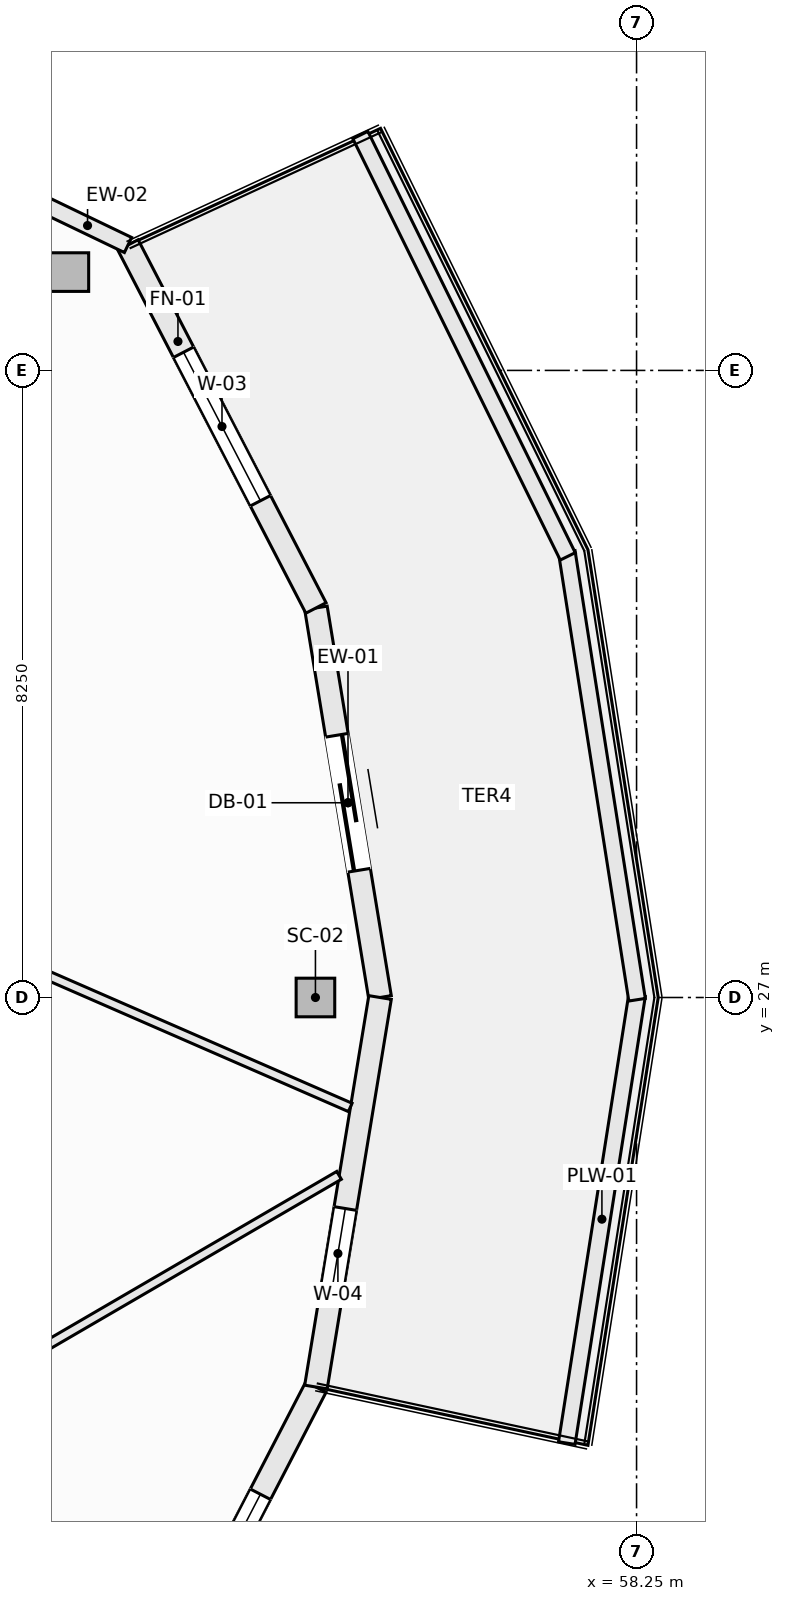
"""IFC4 building model, lengths in metres.
Left out: names, types, materials, properties, quantities, classifications, styles, units other than length and angle.
Written with IfcOpenShell. Run it as: python <this file> out.ifc"""

import sys

from ifc_helpers import new_model, si_unit, direction, frame, frame_2d, origin, origin_2d, place, context, subcontext, project, spatial, rectangle, hollow_rectangle, extrude, element, fill, save


model = new_model("IFC4")
c1 = context("Model", 3, precision=1e-05, world=origin(), true_north=direction((0.0, 1.0)))
c2 = subcontext(c1, "Body", "Model", "MODEL_VIEW")
j1 = project(units=[si_unit("LENGTHUNIT", "METRE"), si_unit("PLANEANGLEUNIT", "RADIAN")], contexts=[c1])
p1 = place(None, origin())
s1 = spatial("IfcSite", under=j1, at=p1, CompositionType="ELEMENT")
p2 = place(p1, origin())
s2 = spatial("IfcBuilding", under=s1, at=p2, CompositionType="ELEMENT")
p3 = place(p2, frame((0.0, 0.0, 232.7)))
s3 = spatial("IfcBuildingStorey", under=s2, at=p3, CompositionType="ELEMENT", Elevation=232.7)
for number, where, z_axis, x_axis in (
    (1, (54.025, 27.0, -0.27), (0.0, 0.0, 1.0), (1.0, 0.0, 0.0)),
    (2, (50.787, 36.544, -0.27), (0.0, 0.0, 1.0), (1.0, 0.0, 0.0)),
):
    element("IfcColumn", number, at=place(p3, frame(where, z_axis=z_axis, x_axis=x_axis)), inside=s3, PredefinedType="COLUMN", context=c2, shape_type="SweptSolid", body=[
        extrude(hollow_rectangle(XDim=0.508, YDim=0.508, WallThickness=0.019, at=origin_2d()), origin(), (0.0, 0.0, 1.0), 3.3),
    ])
p4 = place(p3, frame((54.032, 32.125, 0.0), z_axis=(0.0, 0.0, 1.0), x_axis=(0.16237087798, -0.986729799886, 0.0)))
e3 = element("IfcWall", 3, at=p4, inside=s3, PredefinedType="SOLIDWALL", context=c2, shape_type="SweptSolid", body=[
    extrude(rectangle(XDim=5.193, YDim=0.3, at=frame_2d((2.597, 0.0))), origin(), (0.0, 0.0, 1.0), 2.605),
])
p5 = place(p4, frame((1.697, 0.0, 0.0)))
e4 = element("IfcOpeningElement", 4, at=p5, cuts=e3, PredefinedType="OPENING", context=c2, shape_type="SweptSolid", body=[
    extrude(rectangle(XDim=1.8, YDim=2.25, at=frame_2d((0.9, 1.125))), frame((0.0, 0.16, 0.0), z_axis=(0.0, -1.0, 0.0), x_axis=(1.0, 0.0, 0.0)), (0.0, 0.0, 1.0), 0.32),
])
p6 = place(p3, frame((51.559, 36.9, 0.0), z_axis=(0.0, 0.0, 1.0), x_axis=(0.459808219482, -0.888018243786, 0.0)))
e5 = element("IfcWall", 5, at=p6, inside=s3, PredefinedType="SOLIDWALL", context=c2, shape_type="SweptSolid", body=[
    extrude(rectangle(XDim=5.378, YDim=0.3, at=frame_2d((2.689, 0.0))), origin(), (0.0, 0.0, 1.0), 2.605),
])
p7 = place(p6, frame((1.589, 0.0, 0.72)))
e6 = element("IfcOpeningElement", 6, at=p7, cuts=e5, PredefinedType="OPENING", context=c2, shape_type="SweptSolid", body=[
    extrude(rectangle(XDim=2.2, YDim=1.65, at=frame_2d((1.1, 0.825))), frame((0.0, 0.16, 0.0), z_axis=(0.0, -1.0, 0.0), x_axis=(1.0, 0.0, 0.0)), (0.0, 0.0, 1.0), 0.32),
])
p8 = place(p3, frame((50.494, 37.412, 0.0), z_axis=(0.0, 0.0, 1.0), x_axis=(0.901342408365, -0.433107218692, 0.0)))
e7 = element("IfcWall", 7, at=p8, inside=s3, PredefinedType="SOLIDWALL", context=c2, shape_type="SweptSolid", body=[
    extrude(rectangle(XDim=1.181, YDim=0.22, at=frame_2d((0.591, 0.0))), origin(), (0.0, 0.0, 1.0), 2.605),
])
p9 = place(p3, frame((51.559, 17.1, 0.0), z_axis=(0.0, 0.0, 1.0), x_axis=(0.459808219482, 0.888018243786, 0.0)))
e8 = element("IfcWall", 8, at=p9, inside=s3, PredefinedType="SOLIDWALL", context=c2, shape_type="SweptSolid", body=[
    extrude(rectangle(XDim=5.378, YDim=0.3, at=frame_2d((2.689, 0.0))), origin(), (0.0, 0.0, 1.0), 2.605),
])
p10 = place(p9, frame((1.589, 0.0, 0.72)))
e9 = element("IfcOpeningElement", 9, at=p10, cuts=e8, PredefinedType="OPENING", context=c2, shape_type="SweptSolid", body=[
    extrude(rectangle(XDim=2.2, YDim=1.65, at=frame_2d((1.1, 0.825))), frame((0.0, 0.16, 0.0), z_axis=(0.0, -1.0, 0.0), x_axis=(1.0, 0.0, 0.0)), (0.0, 0.0, 1.0), 0.32),
])
p11 = place(p3, frame((54.032, 21.875, 0.0), z_axis=(0.0, 0.0, 1.0), x_axis=(0.16237087798, 0.986729799886, 0.0)))
e10 = element("IfcWall", 10, at=p11, inside=s3, PredefinedType="SOLIDWALL", context=c2, shape_type="SweptSolid", body=[
    extrude(rectangle(XDim=5.193, YDim=0.3, at=frame_2d((2.597, 0.0))), origin(), (0.0, 0.0, 1.0), 2.605),
])
p12 = place(p11, frame((1.18, 0.0, 0.72)))
e11 = element("IfcOpeningElement", 11, at=p12, cuts=e10, PredefinedType="OPENING", context=c2, shape_type="SweptSolid", body=[
    extrude(rectangle(XDim=1.2, YDim=1.65, at=frame_2d((0.6, 0.825))), frame((0.0, 0.16, 0.0), z_axis=(0.0, -1.0, 0.0), x_axis=(1.0, 0.0, 0.0)), (0.0, 0.0, 1.0), 0.32),
])
for number, where, z_axis, x_axis in (
    (12, (57.332, 21.138, 0.0), (0.0, 0.0, 1.0), (0.155, 0.988, 0.0)),
    (13, (57.332, 32.862, 0.0), (0.0, 0.0, 1.0), (0.155, -0.988, 0.0)),
):
    element("IfcWall", number, at=place(p3, frame(where, z_axis=z_axis, x_axis=x_axis)), inside=s3, PredefinedType="PARAPET", context=c2, shape_type="SweptSolid", body=[
        extrude(rectangle(XDim=5.964, YDim=0.22, at=frame_2d((2.982, 0.0))), origin(), (0.0, 0.0, 1.0), 0.52),
    ])
p13 = place(p3, frame((54.616, 38.347, 0.0), z_axis=(0.0, 0.0, 1.0), x_axis=(0.441640961804, -0.897191875162, 0.0)))
e14 = element("IfcWall", 14, at=p13, inside=s3, PredefinedType="PARAPET", context=c2, shape_type="SweptSolid", body=[
    extrude(rectangle(XDim=6.178, YDim=0.22, at=frame_2d((3.089, 0.0))), origin(), (0.0, 0.0, 1.0), 0.52),
])
p14 = place(p3, frame((43.773, 18.512, 0.0), z_axis=(0.0, 0.0, 1.0), x_axis=(0.864261022419, 0.503043621495, 0.0)))
e15 = element("IfcWall", 15, at=p14, inside=s3, PredefinedType="PARTITIONING", context=c2, shape_type="SweptSolid", body=[
    extrude(rectangle(XDim=12.222, YDim=0.12, at=frame_2d((6.111, 0.0))), origin(), (0.0, 0.0, 1.0), 3.03),
])
p15 = place(p3, frame((41.582, 31.18, 0.0), z_axis=(0.0, 0.0, 1.0), x_axis=(0.916624100851, -0.399750244202, 0.0)))
e16 = element("IfcWall", 16, at=p15, inside=s3, PredefinedType="PARTITIONING", context=c2, shape_type="SweptSolid", body=[
    extrude(rectangle(XDim=14.074, YDim=0.12, at=frame_2d((7.037, 0.0))), origin(), (0.0, 0.0, 1.0), 2.478),
])
p16 = place(p5, origin())
e17 = element("IfcDoor", 17, at=p16, inside=s3, OperationType="SLIDING_TO_LEFT", PredefinedType="DOOR", context=c2, shape_type="SweptSolid", body=[
    extrude(rectangle(XDim=1.8, YDim=2.25, at=frame_2d((0.9, 1.125))), frame((0.0, 0.025, 0.0), z_axis=(0.0, -1.0, 0.0), x_axis=(1.0, 0.0, 0.0)), (0.0, 0.0, 1.0), 0.05),
])
fill(e4, e17)
p17 = place(p7, origin())
e18 = element("IfcWindow", 18, at=p17, inside=s3, PartitioningType="SINGLE_PANEL", PredefinedType="WINDOW", context=c2, shape_type="SweptSolid", body=[
    extrude(rectangle(XDim=2.2, YDim=1.65, at=frame_2d((1.1, 0.825))), frame((0.0, 0.03, 0.0), z_axis=(0.0, -1.0, 0.0), x_axis=(1.0, 0.0, 0.0)), (0.0, 0.0, 1.0), 0.06),
])
fill(e6, e18)
p18 = place(p10, origin())
e19 = element("IfcWindow", 19, at=p18, inside=s3, PartitioningType="SINGLE_PANEL", PredefinedType="WINDOW", context=c2, shape_type="SweptSolid", body=[
    extrude(rectangle(XDim=2.2, YDim=1.65, at=frame_2d((1.1, 0.825))), frame((0.0, 0.03, 0.0), z_axis=(0.0, -1.0, 0.0), x_axis=(1.0, 0.0, 0.0)), (0.0, 0.0, 1.0), 0.06),
])
fill(e9, e19)
p19 = place(p12, origin())
e20 = element("IfcWindow", 20, at=p19, inside=s3, PartitioningType="SINGLE_PANEL", PredefinedType="WINDOW", context=c2, shape_type="SweptSolid", body=[
    extrude(rectangle(XDim=1.2, YDim=1.65, at=frame_2d((0.6, 0.825))), frame((0.0, 0.03, 0.0), z_axis=(0.0, -1.0, 0.0), x_axis=(1.0, 0.0, 0.0)), (0.0, 0.0, 1.0), 0.06),
])
fill(e11, e20)
save(model, sys.argv[1])
